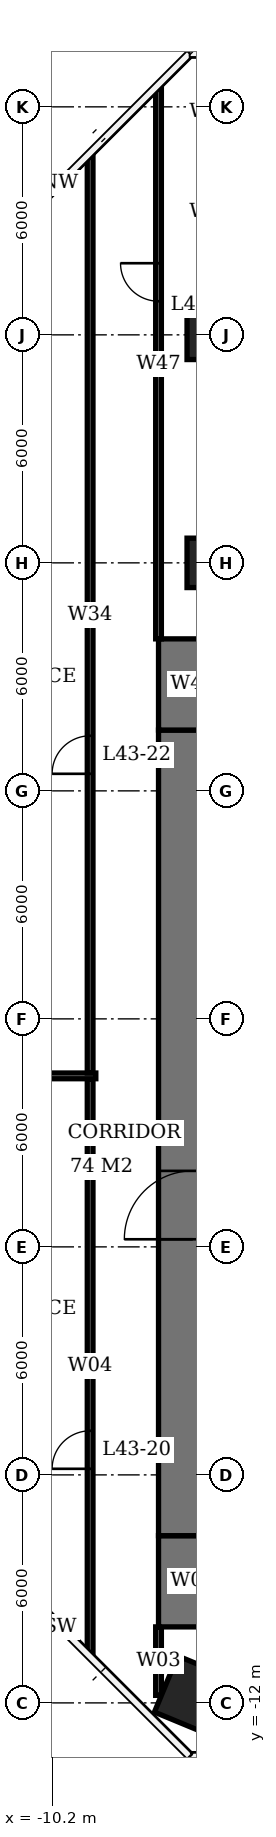
"""IFC4 building model, lengths in metres.
Left out: names, types, materials, properties, quantities, classifications, styles, units other than length and angle.
Written with IfcOpenShell. Run it as: python <this file> out.ifc"""

import sys

from ifc_helpers import new_model, si_unit, direction, frame, frame_2d, origin, origin_2d, place, context, subcontext, project, spatial, rectangle, extrude, element, fill, save


model = new_model("IFC4")
c1 = context("Model", 3, precision=1e-05, world=origin(), true_north=direction((0.0, 1.0)))
c2 = subcontext(c1, "Body", "Model", "MODEL_VIEW")
j1 = project(units=[si_unit("LENGTHUNIT", "METRE"), si_unit("PLANEANGLEUNIT", "RADIAN")], contexts=[c1])
p1 = place(None, origin())
s1 = spatial("IfcSite", under=j1, at=p1, CompositionType="ELEMENT")
p2 = place(p1, origin())
s2 = spatial("IfcBuilding", under=s1, at=p2, CompositionType="ELEMENT")
p3 = place(p2, frame((0.0, 0.0, 177.2)))
s3 = spatial("IfcBuildingStorey", under=s2, at=p3, CompositionType="ELEMENT", Elevation=177.2)
p4 = place(p3, frame((-6.0, -12.0, 0.0), z_axis=(0.0, 0.0, 1.0), x_axis=(-0.923879532511, 0.382683432365, 0.0)))
e1 = element("IfcColumn", 1, at=p4, inside=s3, PredefinedType="COLUMN", context=c2, shape_type="SweptSolid", body=[
    extrude(rectangle(XDim=2.6, YDim=1.6, at=origin_2d()), origin(), (0.0, 0.0, 1.0), 3.9),
])
for number, where, z_axis, x_axis in (
    (2, (-6.0, 18.0, 0.0), (0.0, 0.0, 1.0), (1.0, 0.0, 0.0)),
    (3, (-6.0, 24.0, 0.0), (0.0, 0.0, 1.0), (1.0, 0.0, 0.0)),
):
    element("IfcColumn", number, at=place(p3, frame(where, z_axis=z_axis, x_axis=x_axis)), inside=s3, PredefinedType="COLUMN", context=c2, shape_type="SweptSolid", body=[
        extrude(rectangle(XDim=1.3, YDim=1.3, at=origin_2d()), origin(), (0.0, 0.0, 1.0), 3.9),
    ])
p5 = place(p3, frame((-6.5, -7.6, 0.0), z_axis=(0.0, 0.0, 1.0), x_axis=(0.0, 1.0, 0.0)))
e4 = element("IfcWall", 4, at=p5, inside=s3, PredefinedType="SHEAR", context=c2, shape_type="SweptSolid", body=[
    extrude(rectangle(XDim=21.2, YDim=1.8, at=frame_2d((10.6, 0.0))), origin(), (0.0, 0.0, 1.0), 3.9),
])
p6 = place(p5, frame((7.8, 0.0, 0.0)))
e5 = element("IfcOpeningElement", 5, at=p6, cuts=e4, PredefinedType="OPENING", context=c2, shape_type="SweptSolid", body=[
    extrude(rectangle(XDim=1.8, YDim=2.4, at=frame_2d((0.9, 1.2))), frame((0.0, 0.91, 0.0), z_axis=(0.0, -1.0, 0.0), x_axis=(1.0, 0.0, 0.0)), (0.0, 0.0, 1.0), 1.82),
])
for number, where, z_axis, x_axis in (
    (6, (-6.5, -10.0, 0.0), (0.0, 0.0, 1.0), (0.0, 1.0, 0.0)),
    (7, (-6.5, 13.6, 0.0), (0.0, 0.0, 1.0), (0.0, 1.0, 0.0)),
):
    element("IfcWall", number, at=place(p3, frame(where, z_axis=z_axis, x_axis=x_axis)), inside=s3, PredefinedType="SHEAR", context=c2, shape_type="SweptSolid", body=[
        extrude(rectangle(XDim=2.4, YDim=1.8, at=frame_2d((1.2, 0.0))), origin(), (0.0, 0.0, 1.0), 3.9),
    ])
p7 = place(p3, frame((-13.4, 4.5, 0.0), z_axis=(0.0, 0.0, 1.0), x_axis=(1.0, 0.0, 0.0)))
e8 = element("IfcWall", 8, at=p7, inside=s3, PredefinedType="PARTITIONING", context=c2, shape_type="SweptSolid", body=[
    extrude(rectangle(XDim=4.35, YDim=0.15, at=frame_2d((2.175, 0.0))), origin(), (0.0, 0.0, 1.0), 3.65),
])
p8 = place(p3, frame((-9.2, -10.689, 0.0), z_axis=(0.0, 0.0, 1.0), x_axis=(0.0, 1.0, 0.0)))
e9 = element("IfcWall", 9, at=p8, inside=s3, PredefinedType="PARTITIONING", context=c2, shape_type="SweptSolid", body=[
    extrude(rectangle(XDim=15.114, YDim=0.15, at=frame_2d((7.557, 0.0))), origin(), (0.0, 0.0, 1.0), 3.65),
])
p9 = place(p8, frame((4.849, 0.0, 0.0)))
e10 = element("IfcOpeningElement", 10, at=p9, cuts=e9, PredefinedType="OPENING", context=c2, shape_type="SweptSolid", body=[
    extrude(rectangle(XDim=1.0, YDim=2.1, at=frame_2d((0.5, 1.05))), frame((0.0, 0.085, 0.0), z_axis=(0.0, -1.0, 0.0), x_axis=(1.0, 0.0, 0.0)), (0.0, 0.0, 1.0), 0.17),
])
p10 = place(p3, frame((-9.2, 4.575, 0.0), z_axis=(0.0, 0.0, 1.0), x_axis=(0.0, 1.0, 0.0)))
e11 = element("IfcWall", 11, at=p10, inside=s3, PredefinedType="PARTITIONING", context=c2, shape_type="SweptSolid", body=[
    extrude(rectangle(XDim=24.114, YDim=0.15, at=frame_2d((12.057, 0.0))), origin(), (0.0, 0.0, 1.0), 3.65),
])
p11 = place(p10, frame((7.874, 0.0, 0.0)))
e12 = element("IfcOpeningElement", 12, at=p11, cuts=e11, PredefinedType="OPENING", context=c2, shape_type="SweptSolid", body=[
    extrude(rectangle(XDim=1.0, YDim=2.1, at=frame_2d((0.5, 1.05))), frame((0.0, 0.085, 0.0), z_axis=(0.0, -1.0, 0.0), x_axis=(1.0, 0.0, 0.0)), (0.0, 0.0, 1.0), 0.17),
])
p12 = place(p3, frame((-7.4, -11.802, 0.0), z_axis=(0.0, 0.0, 1.0), x_axis=(0.0, 1.0, 0.0)))
e13 = element("IfcWall", 13, at=p12, inside=s3, PredefinedType="PARTITIONING", context=c2, shape_type="SweptSolid", body=[
    extrude(rectangle(XDim=1.802, YDim=0.15, at=frame_2d((0.901, 0.0))), origin(), (0.0, 0.0, 1.0), 3.65),
])
p13 = place(p3, frame((-7.4, 16.0, 0.0), z_axis=(0.0, 0.0, 1.0), x_axis=(0.0, 1.0, 0.0)))
e14 = element("IfcWall", 14, at=p13, inside=s3, PredefinedType="PARTITIONING", context=c2, shape_type="SweptSolid", body=[
    extrude(rectangle(XDim=14.489, YDim=0.15, at=frame_2d((7.245, 0.0))), origin(), (0.0, 0.0, 1.0), 3.65),
])
p14 = place(p13, frame((8.885, 0.0, 0.0)))
e15 = element("IfcOpeningElement", 15, at=p14, cuts=e14, PredefinedType="OPENING", context=c2, shape_type="SweptSolid", body=[
    extrude(rectangle(XDim=1.0, YDim=2.1, at=frame_2d((0.5, 1.05))), frame((0.0, 0.085, 0.0), z_axis=(0.0, -1.0, 0.0), x_axis=(1.0, 0.0, 0.0)), (0.0, 0.0, 1.0), 0.17),
])
p15 = place(p6, origin())
e16 = element("IfcDoor", 16, at=p15, inside=s3, OperationType="DOUBLE_DOOR_SINGLE_SWING", PredefinedType="DOOR", context=c2, shape_type="SweptSolid", body=[
    extrude(rectangle(XDim=1.8, YDim=2.4, at=frame_2d((0.9, 1.2))), frame((0.0, 0.025, 0.0), z_axis=(0.0, -1.0, 0.0), x_axis=(1.0, 0.0, 0.0)), (0.0, 0.0, 1.0), 0.05),
])
fill(e5, e16)
p16 = place(p9, origin())
e17 = element("IfcDoor", 17, at=p16, inside=s3, OperationType="SINGLE_SWING_LEFT", PredefinedType="DOOR", context=c2, shape_type="SweptSolid", body=[
    extrude(rectangle(XDim=1.0, YDim=2.1, at=frame_2d((0.5, 1.05))), frame((0.0, 0.025, 0.0), z_axis=(0.0, -1.0, 0.0), x_axis=(1.0, 0.0, 0.0)), (0.0, 0.0, 1.0), 0.05),
])
fill(e10, e17)
p17 = place(p11, origin())
e18 = element("IfcDoor", 18, at=p17, inside=s3, OperationType="SINGLE_SWING_LEFT", PredefinedType="DOOR", context=c2, shape_type="SweptSolid", body=[
    extrude(rectangle(XDim=1.0, YDim=2.1, at=frame_2d((0.5, 1.05))), frame((0.0, 0.025, 0.0), z_axis=(0.0, -1.0, 0.0), x_axis=(1.0, 0.0, 0.0)), (0.0, 0.0, 1.0), 0.05),
])
fill(e12, e18)
p18 = place(p14, origin())
e19 = element("IfcDoor", 19, at=p18, inside=s3, OperationType="SINGLE_SWING_RIGHT", PredefinedType="DOOR", context=c2, shape_type="SweptSolid", body=[
    extrude(rectangle(XDim=1.0, YDim=2.1, at=frame_2d((0.5, 1.05))), frame((0.0, 0.025, 0.0), z_axis=(0.0, -1.0, 0.0), x_axis=(1.0, 0.0, 0.0)), (0.0, 0.0, 1.0), 0.05),
])
fill(e15, e19)
save(model, sys.argv[1])
